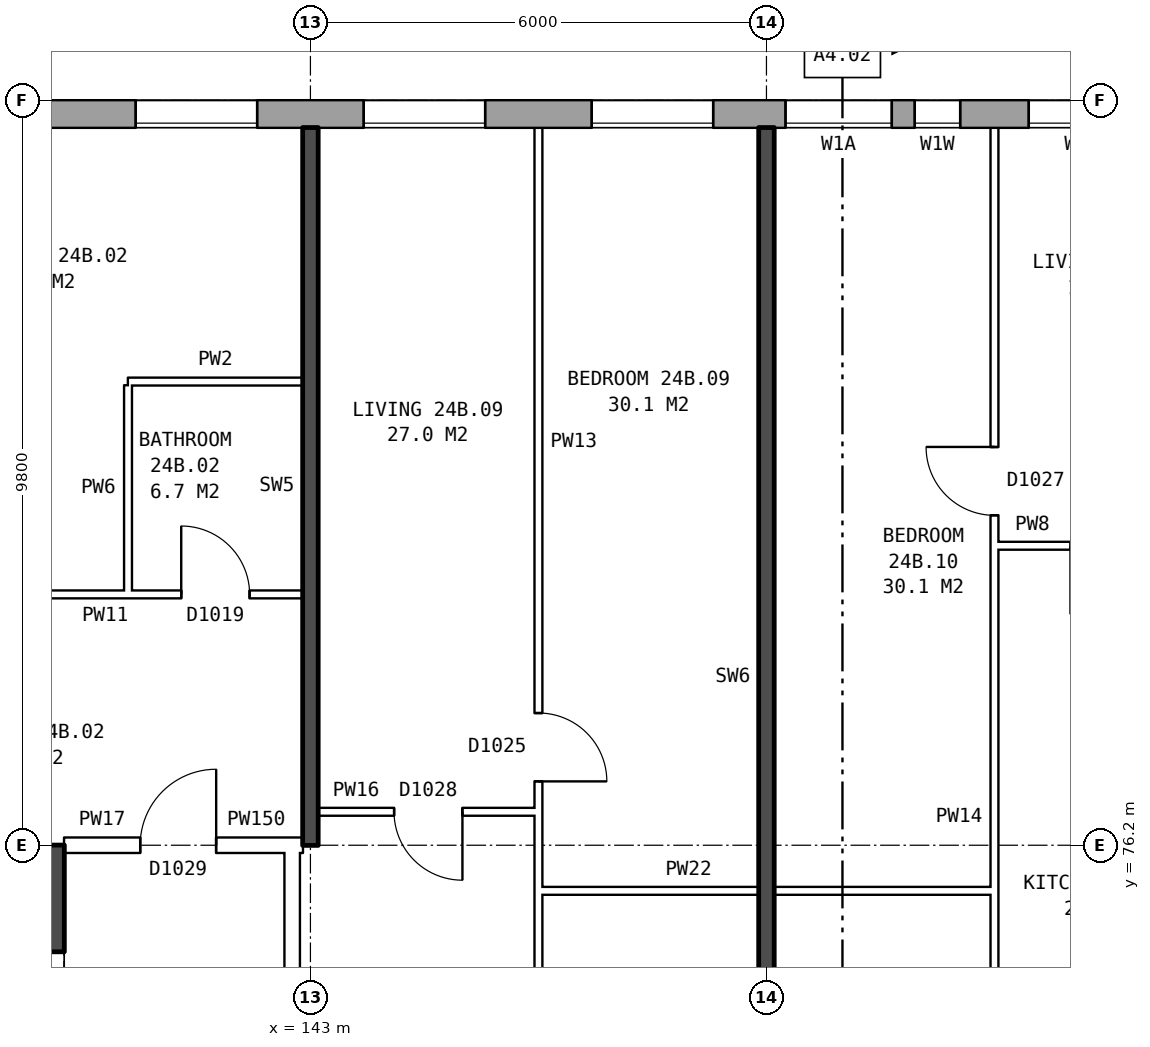
"""IFC4 building model, lengths in metres.
Left out: names, types, materials, properties, quantities, classifications, styles, units other than length and angle.
Written with IfcOpenShell. Run it as: python <this file> out.ifc"""

import sys

from ifc_helpers import new_model, si_unit, direction, frame, frame_2d, origin, place, context, subcontext, project, spatial, rectangle, extrude, element, fill, save


model = new_model("IFC4")
c1 = context("Model", 3, precision=1e-05, world=origin(), true_north=direction((0.0, 1.0)))
c2 = subcontext(c1, "Body", "Model", "MODEL_VIEW")
j1 = project(units=[si_unit("LENGTHUNIT", "METRE"), si_unit("PLANEANGLEUNIT", "RADIAN")], contexts=[c1])
p1 = place(None, origin())
s1 = spatial("IfcSite", under=j1, at=p1, CompositionType="ELEMENT")
p2 = place(p1, origin())
s2 = spatial("IfcBuilding", under=s1, at=p2, CompositionType="ELEMENT")
p3 = place(p2, frame((0.0, 0.0, 87.1)))
s3 = spatial("IfcBuildingStorey", under=s2, at=p3, CompositionType="ELEMENT", Elevation=87.1)
p4 = place(p3, frame((172.175, 85.82, 0.0), z_axis=(0.0, 0.0, 1.0), x_axis=(-1.0, 0.0, 0.0)))
e1 = element("IfcWall", 1, at=p4, inside=s3, PredefinedType="STANDARD", context=c2, shape_type="SweptSolid", body=[
    extrude(rectangle(XDim=38.101, YDim=0.36, at=frame_2d((19.05, 0.0))), origin(), (0.0, 0.0, 1.0), 2.85),
])
p5 = place(p4, frame((2.875, 0.0, 0.8)))
e2 = element("IfcOpeningElement", 2, at=p5, cuts=e1, PredefinedType="OPENING", context=c2, shape_type="SweptSolid", body=[
    extrude(rectangle(XDim=1.6, YDim=1.8, at=frame_2d((0.8, 0.9))), frame((0.0, 0.19, 0.0), z_axis=(0.0, -1.0, 0.0), x_axis=(1.0, 0.0, 0.0)), (0.0, 0.0, 1.0), 0.38),
])
p6 = place(p4, frame((5.875, 0.0, 0.8)))
e3 = element("IfcOpeningElement", 3, at=p6, cuts=e1, PredefinedType="OPENING", context=c2, shape_type="SweptSolid", body=[
    extrude(rectangle(XDim=1.6, YDim=1.8, at=frame_2d((0.8, 0.9))), frame((0.0, 0.19, 0.0), z_axis=(0.0, -1.0, 0.0), x_axis=(1.0, 0.0, 0.0)), (0.0, 0.0, 1.0), 0.38),
])
p7 = place(p4, frame((8.875, 0.0, 0.8)))
e4 = element("IfcOpeningElement", 4, at=p7, cuts=e1, PredefinedType="OPENING", context=c2, shape_type="SweptSolid", body=[
    extrude(rectangle(XDim=1.6, YDim=1.8, at=frame_2d((0.8, 0.9))), frame((0.0, 0.19, 0.0), z_axis=(0.0, -1.0, 0.0), x_axis=(1.0, 0.0, 0.0)), (0.0, 0.0, 1.0), 0.38),
])
p8 = place(p4, frame((11.875, 0.0, 0.8)))
e5 = element("IfcOpeningElement", 5, at=p8, cuts=e1, PredefinedType="OPENING", context=c2, shape_type="SweptSolid", body=[
    extrude(rectangle(XDim=1.6, YDim=1.8, at=frame_2d((0.8, 0.9))), frame((0.0, 0.19, 0.0), z_axis=(0.0, -1.0, 0.0), x_axis=(1.0, 0.0, 0.0)), (0.0, 0.0, 1.0), 0.38),
])
p9 = place(p4, frame((14.875, 0.0, 0.8)))
e6 = element("IfcOpeningElement", 6, at=p9, cuts=e1, PredefinedType="OPENING", context=c2, shape_type="SweptSolid", body=[
    extrude(rectangle(XDim=1.6, YDim=1.8, at=frame_2d((0.8, 0.9))), frame((0.0, 0.19, 0.0), z_axis=(0.0, -1.0, 0.0), x_axis=(1.0, 0.0, 0.0)), (0.0, 0.0, 1.0), 0.38),
])
p10 = place(p4, frame((18.325, 0.0, 0.15)))
e7 = element("IfcOpeningElement", 7, at=p10, cuts=e1, PredefinedType="OPENING", context=c2, shape_type="SweptSolid", body=[
    extrude(rectangle(XDim=1.4, YDim=1.2, at=frame_2d((0.7, 0.6))), frame((0.0, 0.19, 0.0), z_axis=(0.0, -1.0, 0.0), x_axis=(1.0, 0.0, 0.0)), (0.0, 0.0, 1.0), 0.38),
])
p11 = place(p4, frame((20.625, 0.0, 1.7)))
e8 = element("IfcOpeningElement", 8, at=p11, cuts=e1, PredefinedType="OPENING", context=c2, shape_type="SweptSolid", body=[
    extrude(rectangle(XDim=0.6, YDim=0.9, at=frame_2d((0.3, 0.45))), frame((0.0, 0.19, 0.0), z_axis=(0.0, -1.0, 0.0), x_axis=(1.0, 0.0, 0.0)), (0.0, 0.0, 1.0), 0.38),
])
p12 = place(p4, frame((23.875, 0.0, 0.8)))
e9 = element("IfcOpeningElement", 9, at=p12, cuts=e1, PredefinedType="OPENING", context=c2, shape_type="SweptSolid", body=[
    extrude(rectangle(XDim=1.6, YDim=1.8, at=frame_2d((0.8, 0.9))), frame((0.0, 0.19, 0.0), z_axis=(0.0, -1.0, 0.0), x_axis=(1.0, 0.0, 0.0)), (0.0, 0.0, 1.0), 0.38),
])
p13 = place(p4, frame((26.875, 0.0, 0.8)))
e10 = element("IfcOpeningElement", 10, at=p13, cuts=e1, PredefinedType="OPENING", context=c2, shape_type="SweptSolid", body=[
    extrude(rectangle(XDim=1.6, YDim=1.8, at=frame_2d((0.8, 0.9))), frame((0.0, 0.19, 0.0), z_axis=(0.0, -1.0, 0.0), x_axis=(1.0, 0.0, 0.0)), (0.0, 0.0, 1.0), 0.38),
])
p14 = place(p4, frame((29.875, 0.0, 0.8)))
e11 = element("IfcOpeningElement", 11, at=p14, cuts=e1, PredefinedType="OPENING", context=c2, shape_type="SweptSolid", body=[
    extrude(rectangle(XDim=1.6, YDim=1.8, at=frame_2d((0.8, 0.9))), frame((0.0, 0.19, 0.0), z_axis=(0.0, -1.0, 0.0), x_axis=(1.0, 0.0, 0.0)), (0.0, 0.0, 1.0), 0.38),
])
p15 = place(p4, frame((32.875, 0.0, 0.8)))
e12 = element("IfcOpeningElement", 12, at=p15, cuts=e1, PredefinedType="OPENING", context=c2, shape_type="SweptSolid", body=[
    extrude(rectangle(XDim=1.6, YDim=1.8, at=frame_2d((0.8, 0.9))), frame((0.0, 0.19, 0.0), z_axis=(0.0, -1.0, 0.0), x_axis=(1.0, 0.0, 0.0)), (0.0, 0.0, 1.0), 0.38),
])
p16 = place(p4, frame((35.875, 0.0, 0.8)))
e13 = element("IfcOpeningElement", 13, at=p16, cuts=e1, PredefinedType="OPENING", context=c2, shape_type="SweptSolid", body=[
    extrude(rectangle(XDim=1.6, YDim=1.8, at=frame_2d((0.8, 0.9))), frame((0.0, 0.19, 0.0), z_axis=(0.0, -1.0, 0.0), x_axis=(1.0, 0.0, 0.0)), (0.0, 0.0, 1.0), 0.38),
])
p17 = place(p4, frame((21.525, 0.0, 0.8)))
e14 = element("IfcOpeningElement", 14, at=p17, cuts=e1, PredefinedType="OPENING", context=c2, shape_type="SweptSolid", body=[
    extrude(rectangle(XDim=1.4, YDim=1.8, at=frame_2d((0.7, 0.9))), frame((0.0, 0.19, 0.0), z_axis=(0.0, -1.0, 0.0), x_axis=(1.0, 0.0, 0.0)), (0.0, 0.0, 1.0), 0.38),
])
p18 = place(p3, frame((139.41, 64.5, 0.0), z_axis=(0.0, 0.0, 1.0), x_axis=(0.0, 1.0, 0.0)))
e15 = element("IfcWall", 15, at=p18, inside=s3, PredefinedType="SHEAR", context=c2, shape_type="SweptSolid", body=[
    extrude(rectangle(XDim=11.0, YDim=0.7, at=frame_2d((5.5, 0.0))), origin(), (0.0, 0.0, 1.0), 2.85),
])
p19 = place(p18, frame((0.625, 0.0, 0.0)))
e16 = element("IfcOpeningElement", 16, at=p19, cuts=e15, PredefinedType="OPENING", context=c2, shape_type="SweptSolid", body=[
    extrude(rectangle(XDim=1.1, YDim=2.1, at=frame_2d((0.55, 1.05))), frame((0.0, 0.36, 0.0), z_axis=(0.0, -1.0, 0.0), x_axis=(1.0, 0.0, 0.0)), (0.0, 0.0, 1.0), 0.72),
])
p20 = place(p18, frame((9.2, 0.0, 0.0)))
e17 = element("IfcOpeningElement", 17, at=p20, cuts=e15, PredefinedType="OPENING", context=c2, shape_type="SweptSolid", body=[
    extrude(rectangle(XDim=1.1, YDim=2.1, at=frame_2d((0.55, 1.05))), frame((0.0, 0.36, 0.0), z_axis=(0.0, -1.0, 0.0), x_axis=(1.0, 0.0, 0.0)), (0.0, 0.0, 1.0), 0.72),
])
p21 = place(p18, frame((7.425, 0.0, 0.0)))
e18 = element("IfcOpeningElement", 18, at=p21, cuts=e15, PredefinedType="OPENING", context=c2, shape_type="SweptSolid", body=[
    extrude(rectangle(XDim=0.85, YDim=2.1, at=frame_2d((0.425, 1.05))), frame((0.0, 0.36, 0.0), z_axis=(0.0, -1.0, 0.0), x_axis=(1.0, 0.0, 0.0)), (0.0, 0.0, 1.0), 0.72),
])
p22 = place(p3, frame((139.76, 75.85, 0.0), z_axis=(0.0, 0.0, 1.0), x_axis=(-1.0, 0.0, 0.0)))
e19 = element("IfcWall", 19, at=p22, inside=s3, PredefinedType="SHEAR", context=c2, shape_type="SweptSolid", body=[
    extrude(rectangle(XDim=8.4, YDim=0.7, at=frame_2d((4.2, 0.0))), origin(), (0.0, 0.0, 1.0), 2.85),
])
p23 = place(p3, frame((142.76, 63.9, 0.0), z_axis=(0.0, 0.0, 1.0), x_axis=(0.0, 1.0, 0.0)))
e20 = element("IfcWall", 20, at=p23, inside=s3, PredefinedType="PARTITIONING", context=c2, shape_type="SweptSolid", body=[
    extrude(rectangle(XDim=12.2, YDim=0.2, at=frame_2d((6.1, 0.0))), origin(), (0.0, 0.0, 1.0), 2.85),
])
p24 = place(p23, frame((5.1, 0.0, 0.0)))
e21 = element("IfcOpeningElement", 21, at=p24, cuts=e20, PredefinedType="OPENING", context=c2, shape_type="SweptSolid", body=[
    extrude(rectangle(XDim=2.0, YDim=2.1, at=frame_2d((1.0, 1.05))), frame((0.0, 0.11, 0.0), z_axis=(0.0, -1.0, 0.0), x_axis=(1.0, 0.0, 0.0)), (0.0, 0.0, 1.0), 0.22),
])
p25 = place(p3, frame((146.0, 75.6, 0.0), z_axis=(0.0, 0.0, 1.0), x_axis=(1.0, 0.0, 0.0)))
e22 = element("IfcWall", 22, at=p25, inside=s3, PredefinedType="PARTITIONING", context=c2, shape_type="SweptSolid", body=[
    extrude(rectangle(XDim=6.0, YDim=0.1, at=frame_2d((3.0, 0.0))), origin(), (0.0, 0.0, 1.0), 2.85),
])
p26 = place(p3, frame((139.76, 76.2, 0.0), z_axis=(0.0, 0.0, 1.0), x_axis=(1.0, 0.0, 0.0)))
e23 = element("IfcWall", 23, at=p26, inside=s3, PredefinedType="PARTITIONING", context=c2, shape_type="SweptSolid", body=[
    extrude(rectangle(XDim=3.0, YDim=0.2, at=frame_2d((1.5, 0.0))), origin(), (0.0, 0.0, 1.0), 2.85),
])
p27 = place(p26, frame((1.0, 0.0, 0.0)))
e24 = element("IfcOpeningElement", 24, at=p27, cuts=e23, PredefinedType="OPENING", context=c2, shape_type="SweptSolid", body=[
    extrude(rectangle(XDim=1.0, YDim=2.1, at=frame_2d((0.5, 1.05))), frame((0.0, 0.11, 0.0), z_axis=(0.0, -1.0, 0.0), x_axis=(1.0, 0.0, 0.0)), (0.0, 0.0, 1.0), 0.22),
])
p28 = place(p3, frame((142.76, 76.2, 0.0), z_axis=(0.0, 0.0, 1.0), x_axis=(1.0, 0.0, 0.0)))
e25 = element("IfcWall", 25, at=p28, inside=s3, PredefinedType="PARTITIONING", context=c2, shape_type="SweptSolid", body=[
    extrude(rectangle(XDim=0.14, YDim=0.2, at=frame_2d((0.07, 0.0))), origin(), (0.0, 0.0, 1.0), 2.85),
])
p29 = place(p3, frame((143.1, 76.64, 0.0), z_axis=(0.0, 0.0, 1.0), x_axis=(1.0, 0.0, 0.0)))
e26 = element("IfcWall", 26, at=p29, inside=s3, PredefinedType="PARTITIONING", context=c2, shape_type="SweptSolid", body=[
    extrude(rectangle(XDim=2.9, YDim=0.1, at=frame_2d((1.45, 0.0))), origin(), (0.0, 0.0, 1.0), 2.85),
])
p30 = place(p29, frame((1.0, 0.0, 0.0)))
e27 = element("IfcOpeningElement", 27, at=p30, cuts=e26, PredefinedType="OPENING", context=c2, shape_type="SweptSolid", body=[
    extrude(rectangle(XDim=0.9, YDim=2.1, at=frame_2d((0.45, 1.05))), frame((0.0, 0.06, 0.0), z_axis=(0.0, -1.0, 0.0), x_axis=(1.0, 0.0, 0.0)), (0.0, 0.0, 1.0), 0.12),
])
p31 = place(p3, frame((137.1, 79.5, 0.0), z_axis=(0.0, 0.0, 1.0), x_axis=(1.0, 0.0, 0.0)))
e28 = element("IfcWall", 28, at=p31, inside=s3, PredefinedType="PARTITIONING", context=c2, shape_type="SweptSolid", body=[
    extrude(rectangle(XDim=5.8, YDim=0.1, at=frame_2d((2.9, 0.0))), origin(), (0.0, 0.0, 1.0), 2.85),
])
p32 = place(p31, frame((1.3, 0.0, 0.0)))
e29 = element("IfcOpeningElement", 29, at=p32, cuts=e28, PredefinedType="OPENING", context=c2, shape_type="SweptSolid", body=[
    extrude(rectangle(XDim=0.9, YDim=2.1, at=frame_2d((0.45, 1.05))), frame((0.0, 0.06, 0.0), z_axis=(0.0, -1.0, 0.0), x_axis=(1.0, 0.0, 0.0)), (0.0, 0.0, 1.0), 0.12),
])
p33 = place(p31, frame((4.2, 0.0, 0.0)))
e30 = element("IfcOpeningElement", 30, at=p33, cuts=e28, PredefinedType="OPENING", context=c2, shape_type="SweptSolid", body=[
    extrude(rectangle(XDim=0.9, YDim=2.1, at=frame_2d((0.45, 1.05))), frame((0.0, 0.06, 0.0), z_axis=(0.0, -1.0, 0.0), x_axis=(1.0, 0.0, 0.0)), (0.0, 0.0, 1.0), 0.12),
])
p34 = place(p3, frame((152.0, 80.14, 0.0), z_axis=(0.0, 0.0, 1.0), x_axis=(1.0, 0.0, 0.0)))
e31 = element("IfcWall", 31, at=p34, inside=s3, PredefinedType="PARTITIONING", context=c2, shape_type="SweptSolid", body=[
    extrude(rectangle(XDim=2.9, YDim=0.1, at=frame_2d((1.45, 0.0))), origin(), (0.0, 0.0, 1.0), 2.85),
])
p35 = place(p34, frame((1.0, 0.0, 0.0)))
e32 = element("IfcOpeningElement", 32, at=p35, cuts=e31, PredefinedType="OPENING", context=c2, shape_type="SweptSolid", body=[
    extrude(rectangle(XDim=0.9, YDim=2.1, at=frame_2d((0.45, 1.05))), frame((0.0, 0.06, 0.0), z_axis=(0.0, -1.0, 0.0), x_axis=(1.0, 0.0, 0.0)), (0.0, 0.0, 1.0), 0.12),
])
p36 = place(p3, frame((140.6, 82.3, 0.0), z_axis=(0.0, 0.0, 1.0), x_axis=(1.0, 0.0, 0.0)))
e33 = element("IfcWall", 33, at=p36, inside=s3, PredefinedType="PARTITIONING", context=c2, shape_type="SweptSolid", body=[
    extrude(rectangle(XDim=2.3, YDim=0.1, at=frame_2d((1.15, 0.0))), origin(), (0.0, 0.0, 1.0), 2.85),
])
p37 = place(p3, frame((140.6, 79.55, 0.0), z_axis=(0.0, 0.0, 1.0), x_axis=(0.0, 1.0, 0.0)))
e34 = element("IfcWall", 34, at=p37, inside=s3, PredefinedType="PARTITIONING", context=c2, shape_type="SweptSolid", body=[
    extrude(rectangle(XDim=2.7, YDim=0.1, at=frame_2d((1.35, 0.0))), origin(), (0.0, 0.0, 1.0), 2.85),
])
p38 = place(p3, frame((143.0, 76.2, 0.0), z_axis=(0.0, 0.0, 1.0), x_axis=(0.0, 1.0, 0.0)))
e35 = element("IfcWall", 35, at=p38, inside=s3, PredefinedType="SOLIDWALL", context=c2, shape_type="SweptSolid", body=[
    extrude(rectangle(XDim=9.44, YDim=0.2, at=frame_2d((4.72, 0.0))), origin(), (0.0, 0.0, 1.0), 2.85),
])
p39 = place(p3, frame((146.0, 71.3, 0.0), z_axis=(0.0, 0.0, 1.0), x_axis=(0.0, 1.0, 0.0)))
e36 = element("IfcWall", 36, at=p39, inside=s3, PredefinedType="PARTITIONING", context=c2, shape_type="SweptSolid", body=[
    extrude(rectangle(XDim=14.34, YDim=0.1, at=frame_2d((7.17, 0.0))), origin(), (0.0, 0.0, 1.0), 2.85),
])
p40 = place(p39, frame((5.74, 0.0, 0.0)))
e37 = element("IfcOpeningElement", 37, at=p40, cuts=e36, PredefinedType="OPENING", context=c2, shape_type="SweptSolid", body=[
    extrude(rectangle(XDim=0.9, YDim=2.1, at=frame_2d((0.45, 1.05))), frame((0.0, 0.06, 0.0), z_axis=(0.0, -1.0, 0.0), x_axis=(1.0, 0.0, 0.0)), (0.0, 0.0, 1.0), 0.12),
])
p41 = place(p39, frame((0.4, 0.0, 0.0)))
e38 = element("IfcOpeningElement", 38, at=p41, cuts=e36, PredefinedType="OPENING", context=c2, shape_type="SweptSolid", body=[
    extrude(rectangle(XDim=0.9, YDim=2.1, at=frame_2d((0.45, 1.05))), frame((0.0, 0.06, 0.0), z_axis=(0.0, -1.0, 0.0), x_axis=(1.0, 0.0, 0.0)), (0.0, 0.0, 1.0), 0.12),
])
p42 = place(p3, frame((149.0, 71.2, 0.0), z_axis=(0.0, 0.0, 1.0), x_axis=(0.0, 1.0, 0.0)))
e39 = element("IfcWall", 39, at=p42, inside=s3, PredefinedType="SOLIDWALL", context=c2, shape_type="SweptSolid", body=[
    extrude(rectangle(XDim=14.44, YDim=0.2, at=frame_2d((7.22, 0.0))), origin(), (0.0, 0.0, 1.0), 2.85),
])
p43 = place(p3, frame((152.0, 71.3, 0.0), z_axis=(0.0, 0.0, 1.0), x_axis=(0.0, 1.0, 0.0)))
e40 = element("IfcWall", 40, at=p43, inside=s3, PredefinedType="PARTITIONING", context=c2, shape_type="SweptSolid", body=[
    extrude(rectangle(XDim=14.34, YDim=0.1, at=frame_2d((7.17, 0.0))), origin(), (0.0, 0.0, 1.0), 2.85),
])
p44 = place(p43, frame((9.24, 0.0, 0.0)))
e41 = element("IfcOpeningElement", 41, at=p44, cuts=e40, PredefinedType="OPENING", context=c2, shape_type="SweptSolid", body=[
    extrude(rectangle(XDim=0.9, YDim=2.1, at=frame_2d((0.45, 1.05))), frame((0.0, 0.06, 0.0), z_axis=(0.0, -1.0, 0.0), x_axis=(1.0, 0.0, 0.0)), (0.0, 0.0, 1.0), 0.12),
])
p45 = place(p43, frame((0.4, 0.0, 0.0)))
e42 = element("IfcOpeningElement", 42, at=p45, cuts=e40, PredefinedType="OPENING", context=c2, shape_type="SweptSolid", body=[
    extrude(rectangle(XDim=0.9, YDim=2.1, at=frame_2d((0.45, 1.05))), frame((0.0, 0.06, 0.0), z_axis=(0.0, -1.0, 0.0), x_axis=(1.0, 0.0, 0.0)), (0.0, 0.0, 1.0), 0.12),
])
p46 = place(p10, origin())
e43 = element("IfcWindow", 43, at=p46, inside=s3, PartitioningType="SINGLE_PANEL", PredefinedType="WINDOW", context=c2, shape_type="SweptSolid", body=[
    extrude(rectangle(XDim=1.4, YDim=1.2, at=frame_2d((0.7, 0.6))), frame((0.0, 0.15, 0.0), z_axis=(0.0, -1.0, 0.0), x_axis=(1.0, 0.0, 0.0)), (0.0, 0.0, 1.0), 0.06),
])
fill(e7, e43)
p47 = place(p11, origin())
e44 = element("IfcWindow", 44, at=p47, inside=s3, PartitioningType="SINGLE_PANEL", PredefinedType="WINDOW", context=c2, shape_type="SweptSolid", body=[
    extrude(rectangle(XDim=0.6, YDim=0.9, at=frame_2d((0.3, 0.45))), frame((0.0, 0.15, 0.0), z_axis=(0.0, -1.0, 0.0), x_axis=(1.0, 0.0, 0.0)), (0.0, 0.0, 1.0), 0.06),
])
fill(e8, e44)
p48 = place(p12, origin())
e45 = element("IfcWindow", 45, at=p48, inside=s3, PartitioningType="SINGLE_PANEL", PredefinedType="WINDOW", context=c2, shape_type="SweptSolid", body=[
    extrude(rectangle(XDim=1.6, YDim=1.8, at=frame_2d((0.8, 0.9))), frame((0.0, 0.15, 0.0), z_axis=(0.0, -1.0, 0.0), x_axis=(1.0, 0.0, 0.0)), (0.0, 0.0, 1.0), 0.06),
])
fill(e9, e45)
p49 = place(p13, origin())
e46 = element("IfcWindow", 46, at=p49, inside=s3, PartitioningType="SINGLE_PANEL", PredefinedType="WINDOW", context=c2, shape_type="SweptSolid", body=[
    extrude(rectangle(XDim=1.6, YDim=1.8, at=frame_2d((0.8, 0.9))), frame((0.0, 0.15, 0.0), z_axis=(0.0, -1.0, 0.0), x_axis=(1.0, 0.0, 0.0)), (0.0, 0.0, 1.0), 0.06),
])
fill(e10, e46)
p50 = place(p14, origin())
e47 = element("IfcWindow", 47, at=p50, inside=s3, PartitioningType="SINGLE_PANEL", PredefinedType="WINDOW", context=c2, shape_type="SweptSolid", body=[
    extrude(rectangle(XDim=1.6, YDim=1.8, at=frame_2d((0.8, 0.9))), frame((0.0, 0.15, 0.0), z_axis=(0.0, -1.0, 0.0), x_axis=(1.0, 0.0, 0.0)), (0.0, 0.0, 1.0), 0.06),
])
fill(e11, e47)
p51 = place(p27, origin())
e48 = element("IfcDoor", 48, at=p51, inside=s3, OperationType="SINGLE_SWING_RIGHT", PredefinedType="DOOR", context=c2, shape_type="SweptSolid", body=[
    extrude(rectangle(XDim=1.0, YDim=2.1, at=frame_2d((0.5, 1.05))), frame((0.0, 0.025, 0.0), z_axis=(0.0, -1.0, 0.0), x_axis=(1.0, 0.0, 0.0)), (0.0, 0.0, 1.0), 0.05),
])
fill(e24, e48)
p52 = place(p33, origin())
e49 = element("IfcDoor", 49, at=p52, inside=s3, OperationType="SINGLE_SWING_LEFT", PredefinedType="DOOR", context=c2, shape_type="SweptSolid", body=[
    extrude(rectangle(XDim=0.9, YDim=2.1, at=frame_2d((0.45, 1.05))), frame((0.0, 0.025, 0.0), z_axis=(0.0, -1.0, 0.0), x_axis=(1.0, 0.0, 0.0)), (0.0, 0.0, 1.0), 0.05),
])
fill(e30, e49)
p53 = place(p40, frame((0.9, 0.0, 0.0), z_axis=(0.0, 0.0, 1.0), x_axis=(-1.0, 0.0, 0.0)))
e50 = element("IfcDoor", 50, at=p53, inside=s3, OperationType="SINGLE_SWING_RIGHT", PredefinedType="DOOR", context=c2, shape_type="SweptSolid", body=[
    extrude(rectangle(XDim=0.9, YDim=2.1, at=frame_2d((0.45, 1.05))), frame((0.0, 0.025, 0.0), z_axis=(0.0, -1.0, 0.0), x_axis=(1.0, 0.0, 0.0)), (0.0, 0.0, 1.0), 0.05),
])
fill(e37, e50)
p54 = place(p30, frame((0.9, 0.0, 0.0), z_axis=(0.0, 0.0, 1.0), x_axis=(-1.0, 0.0, 0.0)))
e51 = element("IfcDoor", 51, at=p54, inside=s3, OperationType="SINGLE_SWING_LEFT", PredefinedType="DOOR", context=c2, shape_type="SweptSolid", body=[
    extrude(rectangle(XDim=0.9, YDim=2.1, at=frame_2d((0.45, 1.05))), frame((0.0, 0.025, 0.0), z_axis=(0.0, -1.0, 0.0), x_axis=(1.0, 0.0, 0.0)), (0.0, 0.0, 1.0), 0.05),
])
fill(e27, e51)
p55 = place(p44, origin())
e52 = element("IfcDoor", 52, at=p55, inside=s3, OperationType="SINGLE_SWING_RIGHT", PredefinedType="DOOR", context=c2, shape_type="SweptSolid", body=[
    extrude(rectangle(XDim=0.9, YDim=2.1, at=frame_2d((0.45, 1.05))), frame((0.0, 0.025, 0.0), z_axis=(0.0, -1.0, 0.0), x_axis=(1.0, 0.0, 0.0)), (0.0, 0.0, 1.0), 0.05),
])
fill(e41, e52)
p56 = place(p17, origin())
e53 = element("IfcWindow", 53, at=p56, inside=s3, PartitioningType="SINGLE_PANEL", PredefinedType="WINDOW", context=c2, shape_type="SweptSolid", body=[
    extrude(rectangle(XDim=1.4, YDim=1.8, at=frame_2d((0.7, 0.9))), frame((0.0, 0.15, 0.0), z_axis=(0.0, -1.0, 0.0), x_axis=(1.0, 0.0, 0.0)), (0.0, 0.0, 1.0), 0.06),
])
fill(e14, e53)
save(model, sys.argv[1])
